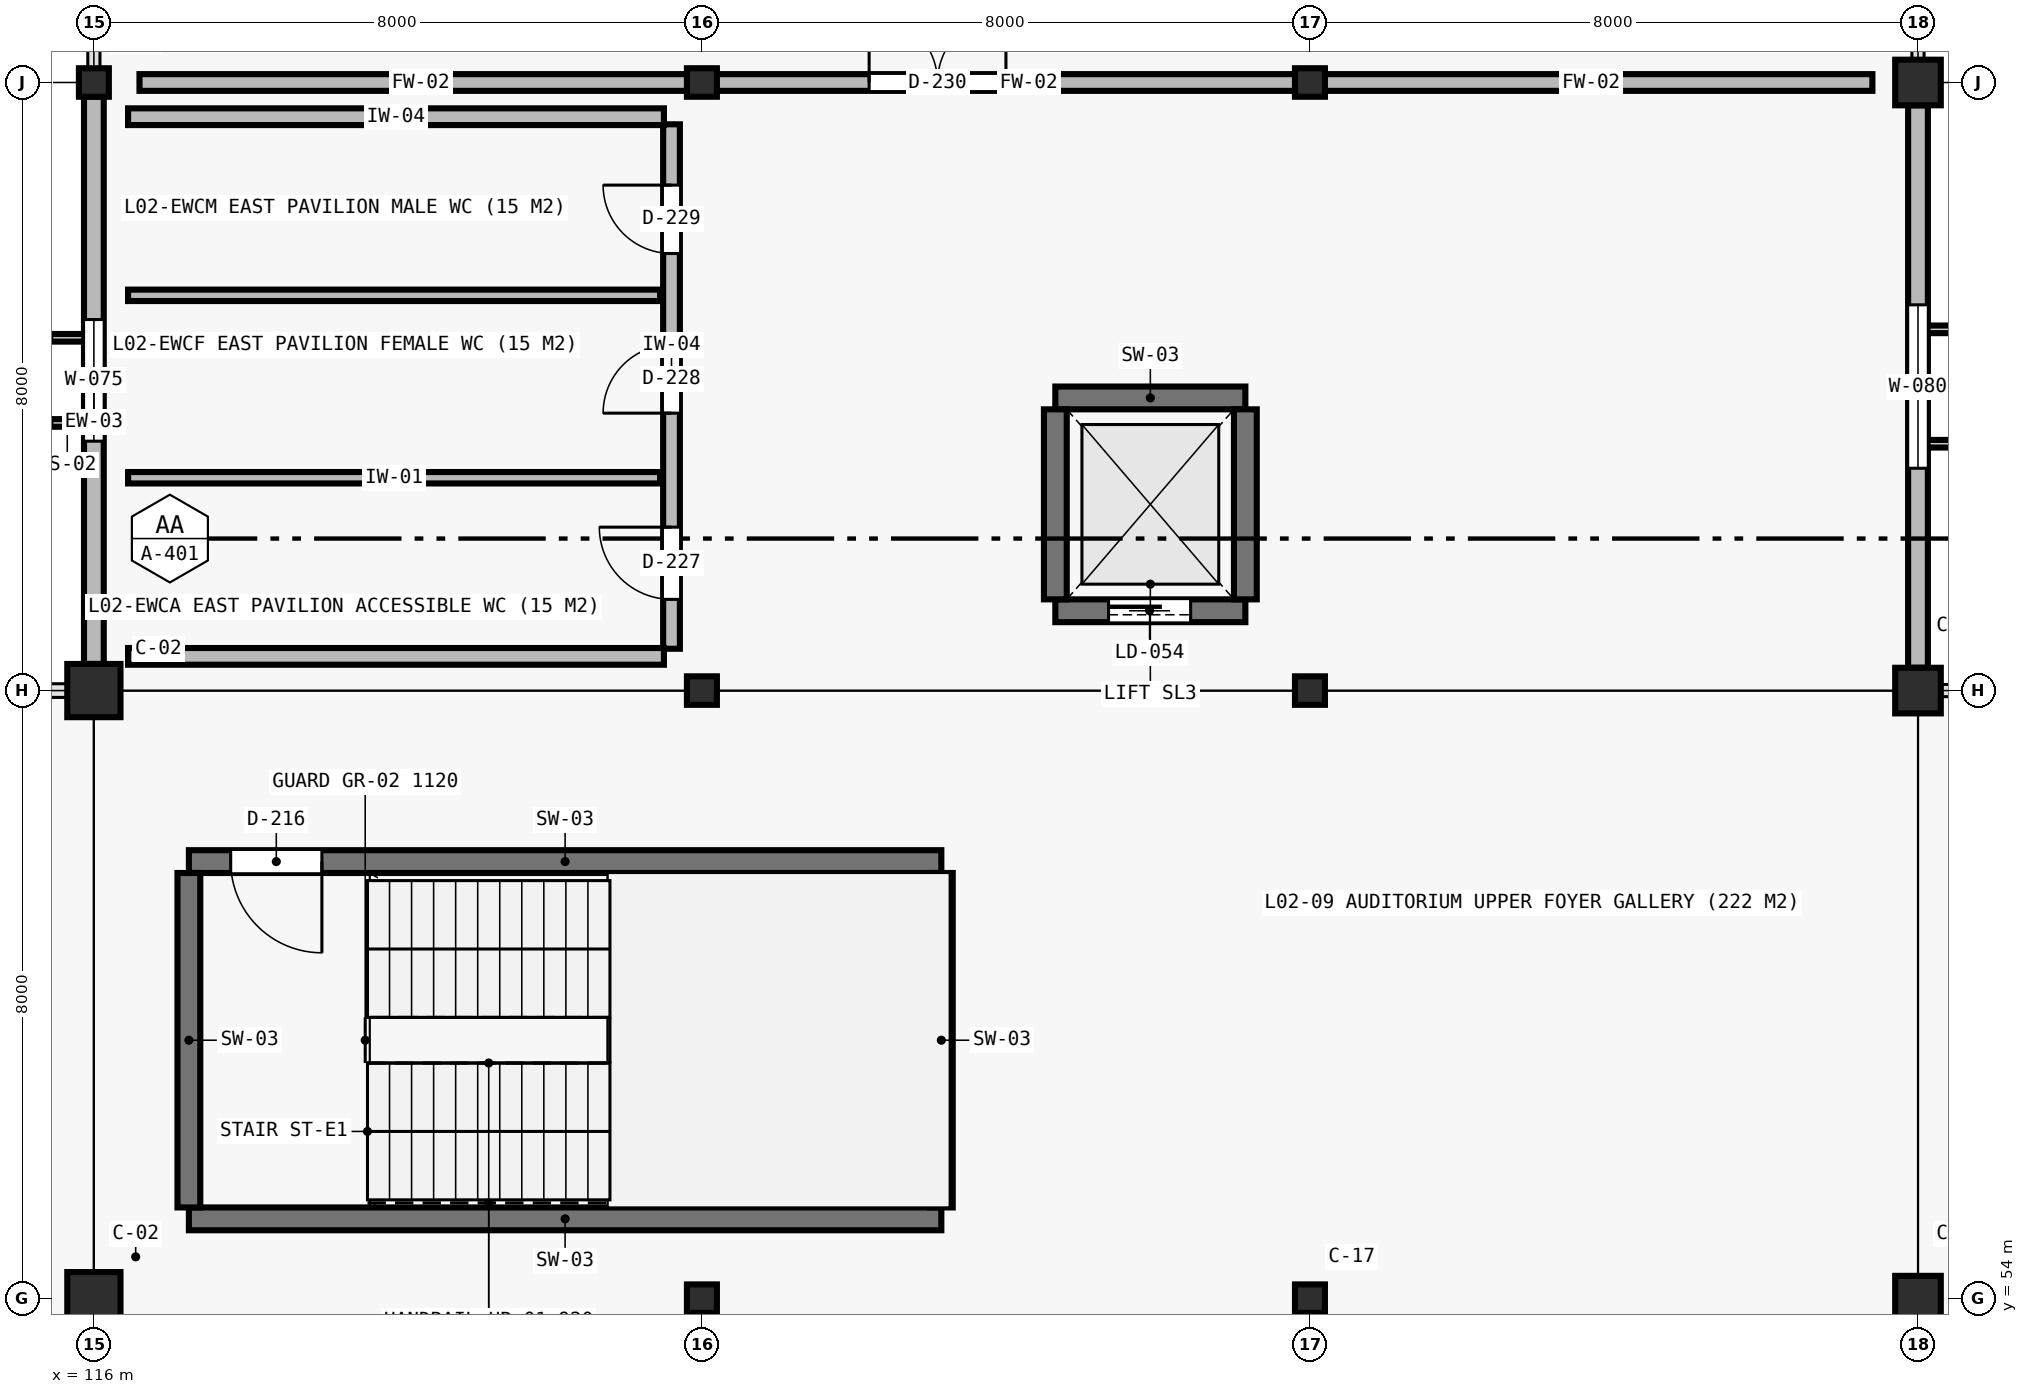
"""IFC4 building model, lengths in metres.
Left out: names, types, materials, properties, quantities, classifications, styles, units other than length and angle.
Written with IfcOpenShell. Run it as: python <this file> out.ifc"""

import sys

from ifc_helpers import new_model, si_unit, direction, frame, frame_2d, origin, origin_2d, place, context, subcontext, project, spatial, rectangle, i_section, extrude, element, fill, save


model = new_model("IFC4")
c1 = context("Model", 3, precision=1e-05, world=origin(), true_north=direction((0.0, 1.0)))
c2 = subcontext(c1, "Body", "Model", "MODEL_VIEW")
j1 = project(units=[si_unit("LENGTHUNIT", "METRE"), si_unit("PLANEANGLEUNIT", "RADIAN")], contexts=[c1])
p1 = place(None, origin())
s1 = spatial("IfcSite", under=j1, at=p1, CompositionType="ELEMENT")
p2 = place(p1, origin())
s2 = spatial("IfcBuilding", under=s1, at=p2, CompositionType="ELEMENT")
p3 = place(p2, frame((0.0, 0.0, 11.2)))
s3 = spatial("IfcBuildingStorey", under=s2, at=p3, CompositionType="ELEMENT", Elevation=11.2)
for number, where, z_axis, x_axis in (
    (1, (116.0, 54.0, 0.0), (0.0, 0.0, 1.0), (1.0, 0.0, 0.0)),
    (2, (116.0, 62.0, 0.0), (0.0, 0.0, 1.0), (1.0, 0.0, 0.0)),
):
    element("IfcColumn", number, at=place(p3, frame(where, z_axis=z_axis, x_axis=x_axis)), inside=s3, PredefinedType="COLUMN", context=c2, shape_type="SweptSolid", body=[
        extrude(rectangle(XDim=0.7, YDim=0.7, at=origin_2d()), origin(), (0.0, 0.0, 1.0), 4.0),
    ])
for number, where, z_axis, x_axis in (
    (3, (116.0, 70.0, 0.0), (0.0, 0.0, 1.0), (1.0, 0.0, 0.0)),
    (4, (124.0, 54.0, 0.0), (0.0, 0.0, 1.0), (1.0, 0.0, 0.0)),
    (5, (124.0, 62.0, 0.0), (0.0, 0.0, 1.0), (1.0, 0.0, 0.0)),
    (6, (124.0, 70.0, 0.0), (0.0, 0.0, 1.0), (1.0, 0.0, 0.0)),
    (7, (132.0, 54.0, 0.0), (0.0, 0.0, 1.0), (1.0, 0.0, 0.0)),
    (8, (132.0, 62.0, 0.0), (0.0, 0.0, 1.0), (1.0, 0.0, 0.0)),
    (9, (132.0, 70.0, 0.0), (0.0, 0.0, 1.0), (1.0, 0.0, 0.0)),
):
    element("IfcColumn", number, at=place(p3, frame(where, z_axis=z_axis, x_axis=x_axis)), inside=s3, PredefinedType="COLUMN", context=c2, shape_type="SweptSolid", body=[
        extrude(i_section(OverallWidth=0.394, OverallDepth=0.375, WebThickness=0.017, FlangeThickness=0.028, at=origin_2d()), origin(), (0.0, 0.0, 1.0), 4.0),
    ])
for number, where, z_axis, x_axis in (
    (10, (140.0, 54.0, 0.0), (0.0, 0.0, 1.0), (1.0, 0.0, 0.0)),
    (11, (140.0, 62.0, 0.0), (0.0, 0.0, 1.0), (1.0, 0.0, 0.0)),
    (12, (140.0, 70.0, 0.0), (0.0, 0.0, 1.0), (1.0, 0.0, 0.0)),
):
    element("IfcColumn", number, at=place(p3, frame(where, z_axis=z_axis, x_axis=x_axis)), inside=s3, PredefinedType="COLUMN", context=c2, shape_type="SweptSolid", body=[
        extrude(rectangle(XDim=0.6, YDim=0.6, at=origin_2d()), origin(), (0.0, 0.0, 1.0), 4.0),
    ])
p4 = place(p3, frame((117.25, 59.75, 0.0), z_axis=(0.0, 0.0, 1.0), x_axis=(1.0, 0.0, 0.0)))
e13 = element("IfcWall", 13, at=p4, inside=s3, PredefinedType="SHEAR", context=c2, shape_type="SweptSolid", body=[
    extrude(rectangle(XDim=9.9, YDim=0.3, at=frame_2d((4.95, 0.0))), origin(), (0.0, 0.0, 1.0), 4.0),
])
p5 = place(p4, frame((0.55, 0.0, 0.0)))
e14 = element("IfcOpeningElement", 14, at=p5, cuts=e13, PredefinedType="OPENING", context=c2, shape_type="SweptSolid", body=[
    extrude(rectangle(XDim=1.2, YDim=2.2, at=frame_2d((0.6, 1.1))), frame((0.0, 0.16, 0.0), z_axis=(0.0, -1.0, 0.0), x_axis=(1.0, 0.0, 0.0)), (0.0, 0.0, 1.0), 0.32),
])
p6 = place(p3, frame((117.25, 55.05, 0.0), z_axis=(0.0, 0.0, 1.0), x_axis=(1.0, 0.0, 0.0)))
e15 = element("IfcWall", 15, at=p6, inside=s3, PredefinedType="SHEAR", context=c2, shape_type="SweptSolid", body=[
    extrude(rectangle(XDim=9.9, YDim=0.3, at=frame_2d((4.95, 0.0))), origin(), (0.0, 0.0, 1.0), 4.0),
])
for number, where, z_axis, x_axis in (
    (16, (117.25, 55.2, 0.0), (0.0, 0.0, 1.0), (0.0, 1.0, 0.0)),
    (17, (127.15, 55.2, 0.0), (0.0, 0.0, 1.0), (0.0, 1.0, 0.0)),
):
    element("IfcWall", number, at=place(p3, frame(where, z_axis=z_axis, x_axis=x_axis)), inside=s3, PredefinedType="SHEAR", context=c2, shape_type="SweptSolid", body=[
        extrude(rectangle(XDim=4.4, YDim=0.3, at=frame_2d((2.2, 0.0))), origin(), (0.0, 0.0, 1.0), 4.0),
    ])
p7 = place(p3, frame((128.65, 65.85, 0.0), z_axis=(0.0, 0.0, 1.0), x_axis=(1.0, 0.0, 0.0)))
e18 = element("IfcWall", 18, at=p7, inside=s3, PredefinedType="SHEAR", context=c2, shape_type="SweptSolid", body=[
    extrude(rectangle(XDim=2.5, YDim=0.3, at=frame_2d((1.25, 0.0))), origin(), (0.0, 0.0, 1.0), 4.0),
])
p8 = place(p3, frame((128.65, 63.05, 0.0), z_axis=(0.0, 0.0, 1.0), x_axis=(1.0, 0.0, 0.0)))
e19 = element("IfcWall", 19, at=p8, inside=s3, PredefinedType="SHEAR", context=c2, shape_type="SweptSolid", body=[
    extrude(rectangle(XDim=2.5, YDim=0.3, at=frame_2d((1.25, 0.0))), origin(), (0.0, 0.0, 1.0), 4.0),
])
p9 = place(p8, frame((0.7, 0.0, 0.0)))
e20 = element("IfcOpeningElement", 20, at=p9, cuts=e19, PredefinedType="OPENING", context=c2, shape_type="SweptSolid", body=[
    extrude(rectangle(XDim=1.08, YDim=2.2, at=frame_2d((0.54, 1.1))), frame((0.0, 0.16, 0.0), z_axis=(0.0, -1.0, 0.0), x_axis=(1.0, 0.0, 0.0)), (0.0, 0.0, 1.0), 0.32),
])
for number, where, z_axis, x_axis in (
    (21, (128.65, 63.2, 0.0), (0.0, 0.0, 1.0), (0.0, 1.0, 0.0)),
    (22, (131.15, 63.2, 0.0), (0.0, 0.0, 1.0), (0.0, 1.0, 0.0)),
):
    element("IfcWall", number, at=place(p3, frame(where, z_axis=z_axis, x_axis=x_axis)), inside=s3, PredefinedType="SHEAR", context=c2, shape_type="SweptSolid", body=[
        extrude(rectangle(XDim=2.5, YDim=0.3, at=frame_2d((1.25, 0.0))), origin(), (0.0, 0.0, 1.0), 4.0),
    ])
p10 = place(p3, frame((116.0, 62.35, 0.0), z_axis=(0.0, 0.0, 1.0), x_axis=(0.0, 1.0, 0.0)))
e23 = element("IfcWall", 23, at=p10, inside=s3, PredefinedType="STANDARD", context=c2, shape_type="SweptSolid", body=[
    extrude(rectangle(XDim=7.462, YDim=0.26, at=frame_2d((3.731, 0.0))), origin(), (0.0, 0.0, 1.0), 3.25),
])
p11 = place(p10, frame((2.931, 0.0, 0.95)))
e24 = element("IfcOpeningElement", 24, at=p11, cuts=e23, PredefinedType="OPENING", context=c2, shape_type="SweptSolid", body=[
    extrude(rectangle(XDim=1.6, YDim=2.2, at=frame_2d((0.8, 1.1))), frame((0.0, 0.14, 0.0), z_axis=(0.0, -1.0, 0.0), x_axis=(1.0, 0.0, 0.0)), (0.0, 0.0, 1.0), 0.28),
])
p12 = place(p3, frame((140.0, 69.7, 0.0), z_axis=(0.0, 0.0, 1.0), x_axis=(0.0, -1.0, 0.0)))
e25 = element("IfcWall", 25, at=p12, inside=s3, PredefinedType="STANDARD", context=c2, shape_type="SweptSolid", body=[
    extrude(rectangle(XDim=7.4, YDim=0.26, at=frame_2d((3.7, 0.0))), origin(), (0.0, 0.0, 1.0), 3.25),
])
p13 = place(p12, frame((2.625, 0.0, 0.95)))
e26 = element("IfcOpeningElement", 26, at=p13, cuts=e25, PredefinedType="OPENING", context=c2, shape_type="SweptSolid", body=[
    extrude(rectangle(XDim=2.15, YDim=1.5, at=frame_2d((1.075, 0.75))), frame((0.0, 0.14, 0.0), z_axis=(0.0, -1.0, 0.0), x_axis=(1.0, 0.0, 0.0)), (0.0, 0.0, 1.0), 0.28),
])
p14 = place(p3, frame((123.6, 62.55, 0.0), z_axis=(0.0, 0.0, 1.0), x_axis=(0.0, 1.0, 0.0)))
e27 = element("IfcWall", 27, at=p14, inside=s3, PredefinedType="PLUMBINGWALL", context=c2, shape_type="SweptSolid", body=[
    extrude(rectangle(XDim=6.9, YDim=0.22, at=frame_2d((3.45, 0.0))), origin(), (0.0, 0.0, 1.0), 4.0),
])
p15 = place(p14, frame((0.65, 0.0, 0.0)))
e28 = element("IfcOpeningElement", 28, at=p15, cuts=e27, PredefinedType="OPENING", context=c2, shape_type="SweptSolid", body=[
    extrude(rectangle(XDim=0.95, YDim=2.1, at=frame_2d((0.475, 1.05))), frame((0.0, 0.12, 0.0), z_axis=(0.0, -1.0, 0.0), x_axis=(1.0, 0.0, 0.0)), (0.0, 0.0, 1.0), 0.24),
])
p16 = place(p14, frame((3.1, 0.0, 0.0)))
e29 = element("IfcOpeningElement", 29, at=p16, cuts=e27, PredefinedType="OPENING", context=c2, shape_type="SweptSolid", body=[
    extrude(rectangle(XDim=0.9, YDim=2.1, at=frame_2d((0.45, 1.05))), frame((0.0, 0.12, 0.0), z_axis=(0.0, -1.0, 0.0), x_axis=(1.0, 0.0, 0.0)), (0.0, 0.0, 1.0), 0.24),
])
p17 = place(p14, frame((5.2, 0.0, 0.0)))
e30 = element("IfcOpeningElement", 30, at=p17, cuts=e27, PredefinedType="OPENING", context=c2, shape_type="SweptSolid", body=[
    extrude(rectangle(XDim=0.9, YDim=2.1, at=frame_2d((0.45, 1.05))), frame((0.0, 0.12, 0.0), z_axis=(0.0, -1.0, 0.0), x_axis=(1.0, 0.0, 0.0)), (0.0, 0.0, 1.0), 0.24),
])
for number, where, z_axis, x_axis in (
    (31, (116.45, 69.55, 0.0), (0.0, 0.0, 1.0), (1.0, 0.0, 0.0)),
    (32, (116.45, 62.45, 0.0), (0.0, 0.0, 1.0), (1.0, 0.0, 0.0)),
):
    element("IfcWall", number, at=place(p3, frame(where, z_axis=z_axis, x_axis=x_axis)), inside=s3, PredefinedType="PLUMBINGWALL", context=c2, shape_type="SweptSolid", body=[
        extrude(rectangle(XDim=7.05, YDim=0.22, at=frame_2d((3.525, 0.0))), origin(), (0.0, 0.0, 1.0), 4.0),
    ])
for number, where, z_axis, x_axis in (
    (33, (116.45, 64.8, 0.0), (0.0, 0.0, 1.0), (1.0, 0.0, 0.0)),
    (34, (116.45, 67.2, 0.0), (0.0, 0.0, 1.0), (1.0, 0.0, 0.0)),
):
    element("IfcWall", number, at=place(p3, frame(where, z_axis=z_axis, x_axis=x_axis)), inside=s3, PredefinedType="PARTITIONING", context=c2, shape_type="SweptSolid", body=[
        extrude(rectangle(XDim=7.0, YDim=0.15, at=frame_2d((3.5, 0.0))), origin(), (0.0, 0.0, 1.0), 4.0),
    ])
p18 = place(p3, frame((116.6, 70.0, 0.0), z_axis=(0.0, 0.0, 1.0), x_axis=(1.0, 0.0, 0.0)))
e35 = element("IfcWall", 35, at=p18, inside=s3, PredefinedType="SOLIDWALL", context=c2, shape_type="SweptSolid", body=[
    extrude(rectangle(XDim=7.4, YDim=0.22, at=frame_2d((3.7, 0.0))), origin(), (0.0, 0.0, 1.0), 3.25),
])
p19 = place(p3, frame((124.0, 70.0, 0.0), z_axis=(0.0, 0.0, 1.0), x_axis=(1.0, 0.0, 0.0)))
e36 = element("IfcWall", 36, at=p19, inside=s3, PredefinedType="SOLIDWALL", context=c2, shape_type="SweptSolid", body=[
    extrude(rectangle(XDim=8.0, YDim=0.22, at=frame_2d((4.0, 0.0))), origin(), (0.0, 0.0, 1.0), 3.456),
])
p20 = place(p19, frame((2.2, 0.0, 0.0)))
e37 = element("IfcOpeningElement", 37, at=p20, cuts=e36, PredefinedType="OPENING", context=c2, shape_type="SweptSolid", body=[
    extrude(rectangle(XDim=1.8, YDim=2.2, at=frame_2d((0.9, 1.1))), frame((0.0, 0.12, 0.0), z_axis=(0.0, -1.0, 0.0), x_axis=(1.0, 0.0, 0.0)), (0.0, 0.0, 1.0), 0.24),
])
p21 = place(p3, frame((132.0, 70.0, 0.0), z_axis=(0.0, 0.0, 1.0), x_axis=(1.0, 0.0, 0.0)))
e38 = element("IfcWall", 38, at=p21, inside=s3, PredefinedType="SOLIDWALL", context=c2, shape_type="SweptSolid", body=[
    extrude(rectangle(XDim=7.4, YDim=0.22, at=frame_2d((3.7, 0.0))), origin(), (0.0, 0.0, 1.0), 3.25),
])
p22 = place(p11, origin())
e39 = element("IfcWindow", 39, at=p22, inside=s3, PartitioningType="SINGLE_PANEL", PredefinedType="WINDOW", context=c2, shape_type="SweptSolid", body=[
    extrude(rectangle(XDim=1.6, YDim=2.2, at=frame_2d((0.8, 1.1))), frame((0.0, 0.03, 0.0), z_axis=(0.0, -1.0, 0.0), x_axis=(1.0, 0.0, 0.0)), (0.0, 0.0, 1.0), 0.06),
])
fill(e24, e39)
p23 = place(p13, origin())
e40 = element("IfcWindow", 40, at=p23, inside=s3, PartitioningType="SINGLE_PANEL", PredefinedType="WINDOW", context=c2, shape_type="SweptSolid", body=[
    extrude(rectangle(XDim=2.15, YDim=1.5, at=frame_2d((1.075, 0.75))), frame((0.0, 0.03, 0.0), z_axis=(0.0, -1.0, 0.0), x_axis=(1.0, 0.0, 0.0)), (0.0, 0.0, 1.0), 0.06),
])
fill(e26, e40)
p24 = place(p5, frame((1.2, 0.0, 0.0), z_axis=(0.0, 0.0, 1.0), x_axis=(-1.0, 0.0, 0.0)))
e41 = element("IfcDoor", 41, at=p24, inside=s3, OperationType="SINGLE_SWING_LEFT", PredefinedType="DOOR", context=c2, shape_type="SweptSolid", body=[
    extrude(rectangle(XDim=1.2, YDim=2.2, at=frame_2d((0.6, 1.1))), frame((0.0, 0.025, 0.0), z_axis=(0.0, -1.0, 0.0), x_axis=(1.0, 0.0, 0.0)), (0.0, 0.0, 1.0), 0.05),
])
fill(e14, e41)
p25 = place(p9, origin())
e42 = element("IfcDoor", 42, at=p25, inside=s3, OperationType="SLIDING_TO_LEFT", PredefinedType="DOOR", context=c2, shape_type="SweptSolid", body=[
    extrude(rectangle(XDim=1.08, YDim=2.2, at=frame_2d((0.54, 1.1))), frame((0.0, 0.025, 0.0), z_axis=(0.0, -1.0, 0.0), x_axis=(1.0, 0.0, 0.0)), (0.0, 0.0, 1.0), 0.05),
])
fill(e20, e42)
p26 = place(p15, origin())
e43 = element("IfcDoor", 43, at=p26, inside=s3, OperationType="SINGLE_SWING_RIGHT", PredefinedType="DOOR", context=c2, shape_type="SweptSolid", body=[
    extrude(rectangle(XDim=0.95, YDim=2.1, at=frame_2d((0.475, 1.05))), frame((0.0, 0.025, 0.0), z_axis=(0.0, -1.0, 0.0), x_axis=(1.0, 0.0, 0.0)), (0.0, 0.0, 1.0), 0.05),
])
fill(e28, e43)
p27 = place(p16, origin())
e44 = element("IfcDoor", 44, at=p27, inside=s3, OperationType="SINGLE_SWING_LEFT", PredefinedType="DOOR", context=c2, shape_type="SweptSolid", body=[
    extrude(rectangle(XDim=0.9, YDim=2.1, at=frame_2d((0.45, 1.05))), frame((0.0, 0.025, 0.0), z_axis=(0.0, -1.0, 0.0), x_axis=(1.0, 0.0, 0.0)), (0.0, 0.0, 1.0), 0.05),
])
fill(e29, e44)
p28 = place(p17, origin())
e45 = element("IfcDoor", 45, at=p28, inside=s3, OperationType="SINGLE_SWING_RIGHT", PredefinedType="DOOR", context=c2, shape_type="SweptSolid", body=[
    extrude(rectangle(XDim=0.9, YDim=2.1, at=frame_2d((0.45, 1.05))), frame((0.0, 0.025, 0.0), z_axis=(0.0, -1.0, 0.0), x_axis=(1.0, 0.0, 0.0)), (0.0, 0.0, 1.0), 0.05),
])
fill(e30, e45)
p29 = place(p20, origin())
e46 = element("IfcDoor", 46, at=p29, inside=s3, OperationType="DOUBLE_DOOR_SINGLE_SWING", PredefinedType="DOOR", context=c2, shape_type="SweptSolid", body=[
    extrude(rectangle(XDim=1.8, YDim=2.2, at=frame_2d((0.9, 1.1))), frame((0.0, 0.025, 0.0), z_axis=(0.0, -1.0, 0.0), x_axis=(1.0, 0.0, 0.0)), (0.0, 0.0, 1.0), 0.05),
])
fill(e37, e46)
save(model, sys.argv[1])
